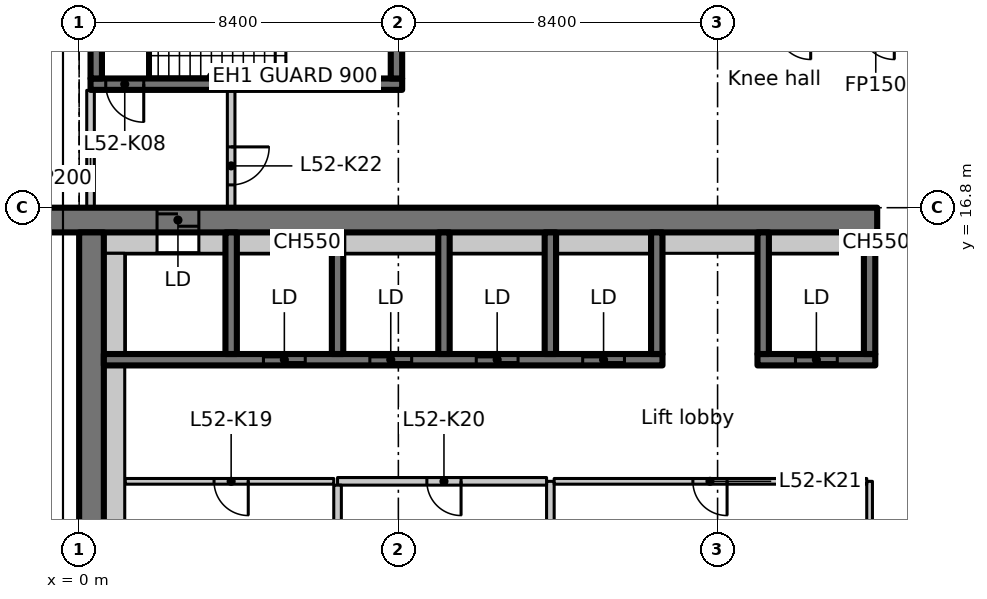
"""IFC4 building model, lengths in metres.
Left out: names, types, materials, properties, quantities, classifications, styles, units other than length and angle.
Written with IfcOpenShell. Run it as: python <this file> out.ifc"""

import sys

from ifc_helpers import new_model, si_unit, direction, frame, frame_2d, origin, place, context, subcontext, project, spatial, rectangle, extrude, element, fill, save


model = new_model("IFC4")
c1 = context("Model", 3, precision=1e-05, world=origin(), true_north=direction((0.0, 1.0)))
c2 = subcontext(c1, "Body", "Model", "MODEL_VIEW")
j1 = project(units=[si_unit("LENGTHUNIT", "METRE"), si_unit("PLANEANGLEUNIT", "RADIAN")], contexts=[c1])
p1 = place(None, origin())
s1 = spatial("IfcSite", under=j1, at=p1, CompositionType="ELEMENT")
p2 = place(p1, origin())
s2 = spatial("IfcBuilding", under=s1, at=p2, CompositionType="ELEMENT")
p3 = place(p2, frame((0.0, 0.0, 206.4)))
s3 = spatial("IfcBuildingStorey", under=s2, at=p3, CompositionType="ELEMENT", Elevation=206.4)
p4 = place(p3, frame((-1.1, 16.475, 0.0), z_axis=(0.0, 0.0, 1.0), x_axis=(1.0, 0.0, 0.0)))
e1 = element("IfcWall", 1, at=p4, inside=s3, PredefinedType="SHEAR", context=c2, shape_type="SweptSolid", body=[
    extrude(rectangle(XDim=22.1, YDim=0.65, at=frame_2d((11.05, 0.0))), origin(), (0.0, 0.0, 1.0), 4.2),
])
p5 = place(p4, frame((3.15, 0.0, 0.0)))
e2 = element("IfcOpeningElement", 2, at=p5, cuts=e1, PredefinedType="OPENING", context=c2, shape_type="SweptSolid", body=[
    extrude(rectangle(XDim=1.1, YDim=2.3, at=frame_2d((0.55, 1.15))), frame((0.0, 0.335, 0.0), z_axis=(0.0, -1.0, 0.0), x_axis=(1.0, 0.0, 0.0)), (0.0, 0.0, 1.0), 0.67),
])
p6 = place(p3, frame((0.325, 7.286, 0.0), z_axis=(0.0, 0.0, 1.0), x_axis=(0.0, 1.0, 0.0)))
e3 = element("IfcWall", 3, at=p6, inside=s3, PredefinedType="SHEAR", context=c2, shape_type="SweptSolid", body=[
    extrude(rectangle(XDim=8.864, YDim=0.65, at=frame_2d((4.432, 0.0))), origin(), (0.0, 0.0, 1.0), 4.2),
])
p7 = place(p3, frame((0.65, 15.875, 0.0), z_axis=(0.0, 0.0, 1.0), x_axis=(1.0, 0.0, 0.0)))
e4 = element("IfcWall", 4, at=p7, inside=s3, PredefinedType="PARTITIONING", context=c2, shape_type="SweptSolid", body=[
    extrude(rectangle(XDim=1.4, YDim=0.55, at=frame_2d((0.7, 0.0))), origin(), (0.0, 0.0, 1.0), 4.2),
])
p8 = place(p3, frame((0.65, 12.8, 0.0), z_axis=(0.0, 0.0, 1.0), x_axis=(1.0, 0.0, 0.0)))
e5 = element("IfcWall", 5, at=p8, inside=s3, PredefinedType="SHEAR", context=c2, shape_type="SweptSolid", body=[
    extrude(rectangle(XDim=14.7, YDim=0.3, at=frame_2d((7.35, 0.0))), origin(), (0.0, 0.0, 1.0), 4.2),
])
p9 = place(p8, frame((4.2, 0.0, 0.0)))
e6 = element("IfcOpeningElement", 6, at=p9, cuts=e5, PredefinedType="OPENING", context=c2, shape_type="SweptSolid", body=[
    extrude(rectangle(XDim=1.1, YDim=2.3, at=frame_2d((0.55, 1.15))), frame((0.0, 0.16, 0.0), z_axis=(0.0, -1.0, 0.0), x_axis=(1.0, 0.0, 0.0)), (0.0, 0.0, 1.0), 0.32),
])
p10 = place(p8, frame((7.0, 0.0, 0.0)))
e7 = element("IfcOpeningElement", 7, at=p10, cuts=e5, PredefinedType="OPENING", context=c2, shape_type="SweptSolid", body=[
    extrude(rectangle(XDim=1.1, YDim=2.3, at=frame_2d((0.55, 1.15))), frame((0.0, 0.16, 0.0), z_axis=(0.0, -1.0, 0.0), x_axis=(1.0, 0.0, 0.0)), (0.0, 0.0, 1.0), 0.32),
])
p11 = place(p8, frame((9.8, 0.0, 0.0)))
e8 = element("IfcOpeningElement", 8, at=p11, cuts=e5, PredefinedType="OPENING", context=c2, shape_type="SweptSolid", body=[
    extrude(rectangle(XDim=1.1, YDim=2.3, at=frame_2d((0.55, 1.15))), frame((0.0, 0.16, 0.0), z_axis=(0.0, -1.0, 0.0), x_axis=(1.0, 0.0, 0.0)), (0.0, 0.0, 1.0), 0.32),
])
p12 = place(p8, frame((12.6, 0.0, 0.0)))
e9 = element("IfcOpeningElement", 9, at=p12, cuts=e5, PredefinedType="OPENING", context=c2, shape_type="SweptSolid", body=[
    extrude(rectangle(XDim=1.1, YDim=2.3, at=frame_2d((0.55, 1.15))), frame((0.0, 0.16, 0.0), z_axis=(0.0, -1.0, 0.0), x_axis=(1.0, 0.0, 0.0)), (0.0, 0.0, 1.0), 0.32),
])
for number, where, z_axis, x_axis in (
    (10, (4.0, 12.95, 0.0), (0.0, 0.0, 1.0), (0.0, 1.0, 0.0)),
    (11, (6.8, 12.95, 0.0), (0.0, 0.0, 1.0), (0.0, 1.0, 0.0)),
    (12, (9.6, 12.95, 0.0), (0.0, 0.0, 1.0), (0.0, 1.0, 0.0)),
    (13, (12.4, 12.95, 0.0), (0.0, 0.0, 1.0), (0.0, 1.0, 0.0)),
    (14, (15.2, 12.95, 0.0), (0.0, 0.0, 1.0), (0.0, 1.0, 0.0)),
):
    element("IfcWall", number, at=place(p3, frame(where, z_axis=z_axis, x_axis=x_axis)), inside=s3, PredefinedType="SHEAR", context=c2, shape_type="SweptSolid", body=[
        extrude(rectangle(XDim=3.2, YDim=0.3, at=frame_2d((1.6, 0.0))), origin(), (0.0, 0.0, 1.0), 4.2),
    ])
p13 = place(p3, frame((17.85, 12.8, 0.0), z_axis=(0.0, 0.0, 1.0), x_axis=(1.0, 0.0, 0.0)))
e15 = element("IfcWall", 15, at=p13, inside=s3, PredefinedType="SHEAR", context=c2, shape_type="SweptSolid", body=[
    extrude(rectangle(XDim=3.1, YDim=0.3, at=frame_2d((1.55, 0.0))), origin(), (0.0, 0.0, 1.0), 4.2),
])
p14 = place(p13, frame((1.0, 0.0, 0.0)))
e16 = element("IfcOpeningElement", 16, at=p14, cuts=e15, PredefinedType="OPENING", context=c2, shape_type="SweptSolid", body=[
    extrude(rectangle(XDim=1.1, YDim=2.3, at=frame_2d((0.55, 1.15))), frame((0.0, 0.16, 0.0), z_axis=(0.0, -1.0, 0.0), x_axis=(1.0, 0.0, 0.0)), (0.0, 0.0, 1.0), 0.32),
])
for number, where, z_axis, x_axis in (
    (17, (18.0, 12.95, 0.0), (0.0, 0.0, 1.0), (0.0, 1.0, 0.0)),
    (18, (20.8, 12.95, 0.0), (0.0, 0.0, 1.0), (0.0, 1.0, 0.0)),
):
    element("IfcWall", number, at=place(p3, frame(where, z_axis=z_axis, x_axis=x_axis)), inside=s3, PredefinedType="SHEAR", context=c2, shape_type="SweptSolid", body=[
        extrude(rectangle(XDim=3.2, YDim=0.3, at=frame_2d((1.6, 0.0))), origin(), (0.0, 0.0, 1.0), 4.2),
    ])
p15 = place(p3, frame((8.5, 20.05, 0.0), z_axis=(0.0, 0.0, 1.0), x_axis=(-1.0, 0.0, 0.0)))
e19 = element("IfcWall", 19, at=p15, inside=s3, PredefinedType="SHEAR", context=c2, shape_type="SweptSolid", body=[
    extrude(rectangle(XDim=8.2, YDim=0.3, at=frame_2d((4.1, 0.0))), origin(), (0.0, 0.0, 1.0), 4.2),
])
p16 = place(p15, frame((6.8, 0.0, 0.0)))
e20 = element("IfcOpeningElement", 20, at=p16, cuts=e19, PredefinedType="OPENING", context=c2, shape_type="SweptSolid", body=[
    extrude(rectangle(XDim=1.0, YDim=2.1, at=frame_2d((0.5, 1.05))), frame((0.0, 0.16, 0.0), z_axis=(0.0, -1.0, 0.0), x_axis=(1.0, 0.0, 0.0)), (0.0, 0.0, 1.0), 0.32),
])
for number, where, z_axis, x_axis in (
    (21, (0.45, 20.2, 0.0), (0.0, 0.0, 1.0), (0.0, 1.0, 0.0)),
    (22, (8.35, 20.2, 0.0), (0.0, 0.0, 1.0), (0.0, 1.0, 0.0)),
):
    element("IfcWall", number, at=place(p3, frame(where, z_axis=z_axis, x_axis=x_axis)), inside=s3, PredefinedType="SHEAR", context=c2, shape_type="SweptSolid", body=[
        extrude(rectangle(XDim=2.55, YDim=0.3, at=frame_2d((1.275, 0.0))), origin(), (0.0, 0.0, 1.0), 4.2),
    ])
p17 = place(p3, frame((0.3, 16.812, 0.0), z_axis=(0.0, 0.0, 1.0), x_axis=(0.0, 1.0, 0.0)))
e23 = element("IfcWall", 23, at=p17, inside=s3, PredefinedType="PARTITIONING", context=c2, shape_type="SweptSolid", body=[
    extrude(rectangle(XDim=3.076, YDim=0.2, at=frame_2d((1.538, 0.0))), origin(), (0.0, 0.0, 1.0), 3.83),
])
p18 = place(p3, frame((4.0, 19.888, 0.0), z_axis=(0.0, 0.0, 1.0), x_axis=(0.0, -1.0, 0.0)))
e24 = element("IfcWall", 24, at=p18, inside=s3, PredefinedType="PARTITIONING", context=c2, shape_type="SweptSolid", body=[
    extrude(rectangle(XDim=3.076, YDim=0.2, at=frame_2d((1.538, 0.0))), origin(), (0.0, 0.0, 1.0), 4.2),
])
p19 = place(p18, frame((1.488, 0.0, 0.0)))
e25 = element("IfcOpeningElement", 25, at=p19, cuts=e24, PredefinedType="OPENING", context=c2, shape_type="SweptSolid", body=[
    extrude(rectangle(XDim=1.0, YDim=2.1, at=frame_2d((0.5, 1.05))), frame((0.0, 0.11, 0.0), z_axis=(0.0, -1.0, 0.0), x_axis=(1.0, 0.0, 0.0)), (0.0, 0.0, 1.0), 0.22),
])
p20 = place(p3, frame((12.4, 7.1, 0.0), z_axis=(0.0, 0.0, 1.0), x_axis=(0.0, 1.0, 0.0)))
e26 = element("IfcWall", 26, at=p20, inside=s3, PredefinedType="PARTITIONING", context=c2, shape_type="SweptSolid", body=[
    extrude(rectangle(XDim=2.5, YDim=0.2, at=frame_2d((1.25, 0.0))), origin(), (0.0, 0.0, 1.0), 4.2),
])
p21 = place(p3, frame((12.3, 9.6, 0.0), z_axis=(0.0, 0.0, 1.0), x_axis=(-1.0, 0.0, 0.0)))
e27 = element("IfcWall", 27, at=p21, inside=s3, PredefinedType="PARTITIONING", context=c2, shape_type="SweptSolid", body=[
    extrude(rectangle(XDim=5.5, YDim=0.2, at=frame_2d((2.75, 0.0))), origin(), (0.0, 0.0, 1.0), 4.2),
])
p22 = place(p21, frame((2.25, 0.0, 0.0)))
e28 = element("IfcOpeningElement", 28, at=p22, cuts=e27, PredefinedType="OPENING", context=c2, shape_type="SweptSolid", body=[
    extrude(rectangle(XDim=0.9, YDim=2.1, at=frame_2d((0.45, 1.05))), frame((0.0, 0.11, 0.0), z_axis=(0.0, -1.0, 0.0), x_axis=(1.0, 0.0, 0.0)), (0.0, 0.0, 1.0), 0.22),
])
p23 = place(p3, frame((6.8, 9.5, 0.0), z_axis=(0.0, 0.0, 1.0), x_axis=(0.0, -1.0, 0.0)))
e29 = element("IfcWall", 29, at=p23, inside=s3, PredefinedType="PARTITIONING", context=c2, shape_type="SweptSolid", body=[
    extrude(rectangle(XDim=2.4, YDim=0.2, at=frame_2d((1.2, 0.0))), origin(), (0.0, 0.0, 1.0), 4.2),
])
p24 = place(p3, frame((6.7, 9.6, 0.0), z_axis=(0.0, 0.0, 1.0), x_axis=(-1.0, 0.0, 0.0)))
e30 = element("IfcWall", 30, at=p24, inside=s3, PredefinedType="PARTITIONING", context=c2, shape_type="SweptSolid", body=[
    extrude(rectangle(XDim=5.488, YDim=0.15, at=frame_2d((2.744, 0.0))), origin(), (0.0, 0.0, 1.0), 4.2),
])
p25 = place(p24, frame((2.25, 0.0, 0.0)))
e31 = element("IfcOpeningElement", 31, at=p25, cuts=e30, PredefinedType="OPENING", context=c2, shape_type="SweptSolid", body=[
    extrude(rectangle(XDim=0.9, YDim=2.1, at=frame_2d((0.45, 1.05))), frame((0.0, 0.085, 0.0), z_axis=(0.0, -1.0, 0.0), x_axis=(1.0, 0.0, 0.0)), (0.0, 0.0, 1.0), 0.17),
])
p26 = place(p3, frame((20.8, 7.075, 0.0), z_axis=(0.0, 0.0, 1.0), x_axis=(0.0, 1.0, 0.0)))
e32 = element("IfcWall", 32, at=p26, inside=s3, PredefinedType="PARTITIONING", context=c2, shape_type="SweptSolid", body=[
    extrude(rectangle(XDim=2.525, YDim=0.15, at=frame_2d((1.263, 0.0))), origin(), (0.0, 0.0, 1.0), 4.2),
])
p27 = place(p3, frame((20.725, 9.6, 0.0), z_axis=(0.0, 0.0, 1.0), x_axis=(-1.0, 0.0, 0.0)))
e33 = element("IfcWall", 33, at=p27, inside=s3, PredefinedType="PARTITIONING", context=c2, shape_type="SweptSolid", body=[
    extrude(rectangle(XDim=8.225, YDim=0.15, at=frame_2d((4.113, 0.0))), origin(), (0.0, 0.0, 1.0), 4.2),
])
p28 = place(p27, frame((3.675, 0.0, 0.0)))
e34 = element("IfcOpeningElement", 34, at=p28, cuts=e33, PredefinedType="OPENING", context=c2, shape_type="SweptSolid", body=[
    extrude(rectangle(XDim=0.9, YDim=2.1, at=frame_2d((0.45, 1.05))), frame((0.0, 0.085, 0.0), z_axis=(0.0, -1.0, 0.0), x_axis=(1.0, 0.0, 0.0)), (0.0, 0.0, 1.0), 0.17),
])
p29 = place(p3, frame((0.925, 7.286, 0.0), z_axis=(0.0, 0.0, 1.0), x_axis=(0.0, 1.0, 0.0)))
e35 = element("IfcWall", 35, at=p29, inside=s3, PredefinedType="PARTITIONING", context=c2, shape_type="SweptSolid", body=[
    extrude(rectangle(XDim=5.364, YDim=0.55, at=frame_2d((2.682, 0.0))), origin(), (0.0, 0.0, 1.0), 4.2),
])
p30 = place(p3, frame((0.925, 12.95, 0.0), z_axis=(0.0, 0.0, 1.0), x_axis=(0.0, 1.0, 0.0)))
e36 = element("IfcWall", 36, at=p30, inside=s3, PredefinedType="PARTITIONING", context=c2, shape_type="SweptSolid", body=[
    extrude(rectangle(XDim=2.65, YDim=0.55, at=frame_2d((1.325, 0.0))), origin(), (0.0, 0.0, 1.0), 4.2),
])
p31 = place(p3, frame((3.15, 15.875, 0.0), z_axis=(0.0, 0.0, 1.0), x_axis=(1.0, 0.0, 0.0)))
e37 = element("IfcWall", 37, at=p31, inside=s3, PredefinedType="PARTITIONING", context=c2, shape_type="SweptSolid", body=[
    extrude(rectangle(XDim=0.7, YDim=0.55, at=frame_2d((0.35, 0.0))), origin(), (0.0, 0.0, 1.0), 4.2),
])
for number, where, z_axis, x_axis in (
    (38, (4.15, 15.875, 0.0), (0.0, 0.0, 1.0), (1.0, 0.0, 0.0)),
    (39, (6.95, 15.875, 0.0), (0.0, 0.0, 1.0), (1.0, 0.0, 0.0)),
    (40, (9.75, 15.875, 0.0), (0.0, 0.0, 1.0), (1.0, 0.0, 0.0)),
    (41, (12.55, 15.875, 0.0), (0.0, 0.0, 1.0), (1.0, 0.0, 0.0)),
    (42, (15.35, 15.875, 0.0), (0.0, 0.0, 1.0), (1.0, 0.0, 0.0)),
    (43, (18.15, 15.875, 0.0), (0.0, 0.0, 1.0), (1.0, 0.0, 0.0)),
):
    element("IfcWall", number, at=place(p3, frame(where, z_axis=z_axis, x_axis=x_axis)), inside=s3, PredefinedType="PARTITIONING", context=c2, shape_type="SweptSolid", body=[
        extrude(rectangle(XDim=2.5, YDim=0.55, at=frame_2d((1.25, 0.0))), origin(), (0.0, 0.0, 1.0), 4.2),
    ])
p32 = place(p3, frame((20.95, 15.875, 0.0), z_axis=(0.0, 0.0, 1.0), x_axis=(1.0, 0.0, 0.0)))
e44 = element("IfcWall", 44, at=p32, inside=s3, PredefinedType="PARTITIONING", context=c2, shape_type="SweptSolid", body=[
    extrude(rectangle(XDim=0.05, YDim=0.55, at=frame_2d((0.025, 0.0))), origin(), (0.0, 0.0, 1.0), 4.2),
])
p33 = place(p5, origin())
e45 = element("IfcDoor", 45, at=p33, inside=s3, OperationType="SLIDING_TO_LEFT", PredefinedType="DOOR", context=c2, shape_type="SweptSolid", body=[
    extrude(rectangle(XDim=1.1, YDim=2.3, at=frame_2d((0.55, 1.15))), frame((0.0, 0.025, 0.0), z_axis=(0.0, -1.0, 0.0), x_axis=(1.0, 0.0, 0.0)), (0.0, 0.0, 1.0), 0.05),
])
fill(e2, e45)
p34 = place(p9, origin())
e46 = element("IfcDoor", 46, at=p34, inside=s3, OperationType="SLIDING_TO_LEFT", PredefinedType="DOOR", context=c2, shape_type="SweptSolid", body=[
    extrude(rectangle(XDim=1.1, YDim=2.3, at=frame_2d((0.55, 1.15))), frame((0.0, 0.025, 0.0), z_axis=(0.0, -1.0, 0.0), x_axis=(1.0, 0.0, 0.0)), (0.0, 0.0, 1.0), 0.05),
])
fill(e6, e46)
p35 = place(p10, origin())
e47 = element("IfcDoor", 47, at=p35, inside=s3, OperationType="SLIDING_TO_LEFT", PredefinedType="DOOR", context=c2, shape_type="SweptSolid", body=[
    extrude(rectangle(XDim=1.1, YDim=2.3, at=frame_2d((0.55, 1.15))), frame((0.0, 0.025, 0.0), z_axis=(0.0, -1.0, 0.0), x_axis=(1.0, 0.0, 0.0)), (0.0, 0.0, 1.0), 0.05),
])
fill(e7, e47)
p36 = place(p11, origin())
e48 = element("IfcDoor", 48, at=p36, inside=s3, OperationType="SLIDING_TO_LEFT", PredefinedType="DOOR", context=c2, shape_type="SweptSolid", body=[
    extrude(rectangle(XDim=1.1, YDim=2.3, at=frame_2d((0.55, 1.15))), frame((0.0, 0.025, 0.0), z_axis=(0.0, -1.0, 0.0), x_axis=(1.0, 0.0, 0.0)), (0.0, 0.0, 1.0), 0.05),
])
fill(e8, e48)
p37 = place(p12, origin())
e49 = element("IfcDoor", 49, at=p37, inside=s3, OperationType="SLIDING_TO_LEFT", PredefinedType="DOOR", context=c2, shape_type="SweptSolid", body=[
    extrude(rectangle(XDim=1.1, YDim=2.3, at=frame_2d((0.55, 1.15))), frame((0.0, 0.025, 0.0), z_axis=(0.0, -1.0, 0.0), x_axis=(1.0, 0.0, 0.0)), (0.0, 0.0, 1.0), 0.05),
])
fill(e9, e49)
p38 = place(p14, origin())
e50 = element("IfcDoor", 50, at=p38, inside=s3, OperationType="SLIDING_TO_LEFT", PredefinedType="DOOR", context=c2, shape_type="SweptSolid", body=[
    extrude(rectangle(XDim=1.1, YDim=2.3, at=frame_2d((0.55, 1.15))), frame((0.0, 0.025, 0.0), z_axis=(0.0, -1.0, 0.0), x_axis=(1.0, 0.0, 0.0)), (0.0, 0.0, 1.0), 0.05),
])
fill(e16, e50)
p39 = place(p16, origin())
e51 = element("IfcDoor", 51, at=p39, inside=s3, OperationType="SINGLE_SWING_LEFT", PredefinedType="DOOR", context=c2, shape_type="SweptSolid", body=[
    extrude(rectangle(XDim=1.0, YDim=2.1, at=frame_2d((0.5, 1.05))), frame((0.0, 0.025, 0.0), z_axis=(0.0, -1.0, 0.0), x_axis=(1.0, 0.0, 0.0)), (0.0, 0.0, 1.0), 0.05),
])
fill(e20, e51)
p40 = place(p25, origin())
e52 = element("IfcDoor", 52, at=p40, inside=s3, OperationType="SINGLE_SWING_RIGHT", PredefinedType="DOOR", context=c2, shape_type="SweptSolid", body=[
    extrude(rectangle(XDim=0.9, YDim=2.1, at=frame_2d((0.45, 1.05))), frame((0.0, 0.025, 0.0), z_axis=(0.0, -1.0, 0.0), x_axis=(1.0, 0.0, 0.0)), (0.0, 0.0, 1.0), 0.05),
])
fill(e31, e52)
p41 = place(p22, origin())
e53 = element("IfcDoor", 53, at=p41, inside=s3, OperationType="SINGLE_SWING_LEFT", PredefinedType="DOOR", context=c2, shape_type="SweptSolid", body=[
    extrude(rectangle(XDim=0.9, YDim=2.1, at=frame_2d((0.45, 1.05))), frame((0.0, 0.025, 0.0), z_axis=(0.0, -1.0, 0.0), x_axis=(1.0, 0.0, 0.0)), (0.0, 0.0, 1.0), 0.05),
])
fill(e28, e53)
p42 = place(p28, origin())
e54 = element("IfcDoor", 54, at=p42, inside=s3, OperationType="SINGLE_SWING_RIGHT", PredefinedType="DOOR", context=c2, shape_type="SweptSolid", body=[
    extrude(rectangle(XDim=0.9, YDim=2.1, at=frame_2d((0.45, 1.05))), frame((0.0, 0.025, 0.0), z_axis=(0.0, -1.0, 0.0), x_axis=(1.0, 0.0, 0.0)), (0.0, 0.0, 1.0), 0.05),
])
fill(e34, e54)
p43 = place(p19, origin())
e55 = element("IfcDoor", 55, at=p43, inside=s3, OperationType="SINGLE_SWING_LEFT", PredefinedType="DOOR", context=c2, shape_type="SweptSolid", body=[
    extrude(rectangle(XDim=1.0, YDim=2.1, at=frame_2d((0.5, 1.05))), frame((0.0, 0.025, 0.0), z_axis=(0.0, -1.0, 0.0), x_axis=(1.0, 0.0, 0.0)), (0.0, 0.0, 1.0), 0.05),
])
fill(e25, e55)
save(model, sys.argv[1])
